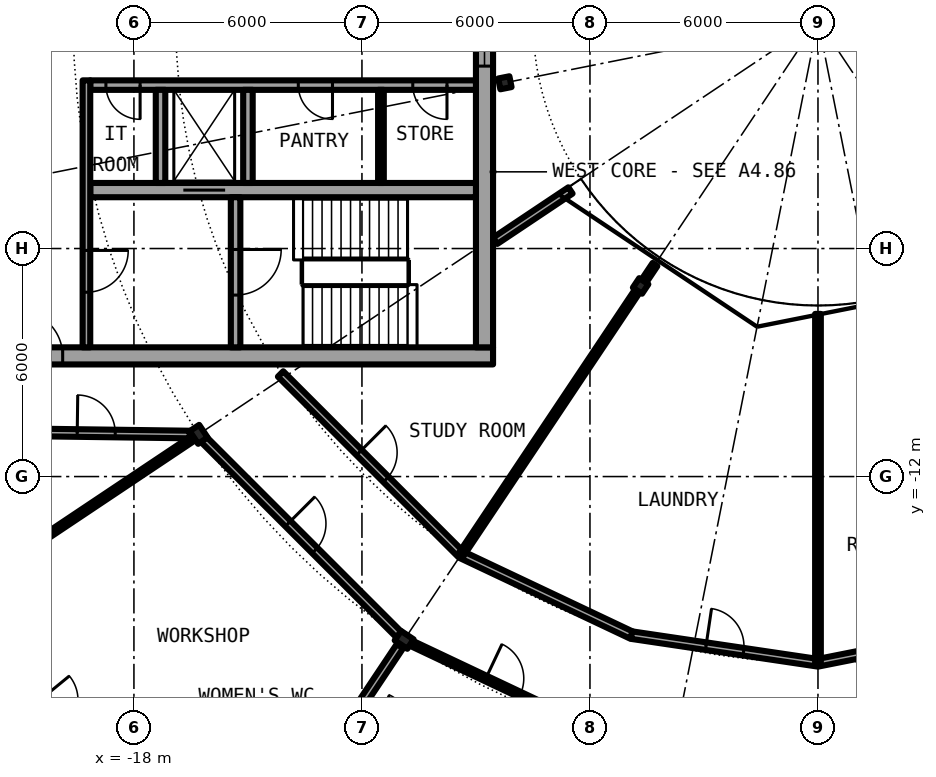
"""IFC4 building model, lengths in metres.
Left out: names, types, materials, properties, quantities, classifications, styles, units other than length and angle.
Written with IfcOpenShell. Run it as: python <this file> out.ifc"""

import sys

from ifc_helpers import new_model, si_unit, direction, frame, frame_2d, origin, origin_2d, place, context, subcontext, project, spatial, rectangle, i_section, extrude, element, fill, save


model = new_model("IFC4")
c1 = context("Model", 3, precision=1e-05, world=origin(), true_north=direction((0.0, 1.0)))
c2 = subcontext(c1, "Body", "Model", "MODEL_VIEW")
j1 = project(units=[si_unit("LENGTHUNIT", "METRE"), si_unit("PLANEANGLEUNIT", "RADIAN")], contexts=[c1])
p1 = place(None, origin())
s1 = spatial("IfcSite", under=j1, at=p1, CompositionType="ELEMENT")
p2 = place(p1, origin())
s2 = spatial("IfcBuilding", under=s1, at=p2, CompositionType="ELEMENT")
p3 = place(p2, frame((0.0, 0.0, 208.5)))
s3 = spatial("IfcBuildingStorey", under=s2, at=p3, CompositionType="ELEMENT", Elevation=208.5)
for number, where, z_axis, x_axis in (
    (1, (-16.297, -10.889, 0.0), (0.0, 0.0, 1.0), (-0.831, -0.556, 0.0)),
    (2, (-10.889, -16.297, 0.0), (0.0, 0.0, 1.0), (-0.556, -0.831, 0.0)),
):
    element("IfcColumn", number, at=place(p3, frame(where, z_axis=z_axis, x_axis=x_axis)), inside=s3, PredefinedType="COLUMN", context=c2, shape_type="SweptSolid", body=[
        extrude(i_section(OverallWidth=0.3, OverallDepth=0.4, WebThickness=0.013, FlangeThickness=0.024, FilletRadius=0.027, at=origin_2d()), origin(), (0.0, 0.0, 1.0), 4.2),
    ])
for number, where, z_axis, x_axis in (
    (3, (-8.239, -1.639, 0.0), (0.0, 0.0, 1.0), (-0.981, -0.195, 0.0)),
    (4, (-4.667, -6.984, 0.0), (0.0, 0.0, 1.0), (-0.556, -0.831, 0.0)),
):
    element("IfcColumn", number, at=place(p3, frame(where, z_axis=z_axis, x_axis=x_axis)), inside=s3, PredefinedType="COLUMN", context=c2, shape_type="SweptSolid", body=[
        extrude(i_section(OverallWidth=0.3, OverallDepth=0.29, WebThickness=0.009, FlangeThickness=0.014, FilletRadius=0.027, at=origin_2d()), origin(), (0.0, 0.0, 1.0), 4.2),
    ])
p4 = place(p3, frame((-22.699, -15.167, 0.0), z_axis=(0.0, 0.0, 1.0), x_axis=(0.634382322723, -0.773019449054, 0.0)))
e5 = element("IfcWall", 5, at=p4, inside=s3, PredefinedType="SOLIDWALL", context=c2, shape_type="SweptSolid", body=[
    extrude(rectangle(XDim=5.352, YDim=0.25, at=frame_2d((2.676, 0.0))), origin(), (0.0, 0.0, 1.0), 3.85),
])
p5 = place(p4, frame((0.841, 0.0, 0.0)))
e6 = element("IfcOpeningElement", 6, at=p5, cuts=e5, PredefinedType="OPENING", context=c2, shape_type="SweptSolid", body=[
    extrude(rectangle(XDim=1.0, YDim=2.2, at=frame_2d((0.5, 1.1))), frame((0.0, 0.135, 0.0), z_axis=(0.0, -1.0, 0.0), x_axis=(1.0, 0.0, 0.0)), (0.0, 0.0, 1.0), 0.27),
])
p6 = place(p4, frame((3.51, 0.0, 0.0)))
e7 = element("IfcOpeningElement", 7, at=p6, cuts=e5, PredefinedType="OPENING", context=c2, shape_type="SweptSolid", body=[
    extrude(rectangle(XDim=1.0, YDim=2.2, at=frame_2d((0.5, 1.1))), frame((0.0, 0.135, 0.0), z_axis=(0.0, -1.0, 0.0), x_axis=(1.0, 0.0, 0.0)), (0.0, 0.0, 1.0), 0.27),
])
p7 = place(p3, frame((-22.05, -8.825, 0.0), z_axis=(0.0, 0.0, 1.0), x_axis=(1.0, 0.0, 0.0)))
e8 = element("IfcWall", 8, at=p7, inside=s3, PredefinedType="SHEAR", context=c2, shape_type="SweptSolid", body=[
    extrude(rectangle(XDim=13.5, YDim=0.45, at=frame_2d((6.75, 0.0))), origin(), (0.0, 0.0, 1.0), 4.2),
])
p8 = place(p7, frame((0.975, 0.0, 0.0)))
e9 = element("IfcOpeningElement", 9, at=p8, cuts=e8, PredefinedType="OPENING", context=c2, shape_type="SweptSolid", body=[
    extrude(rectangle(XDim=1.2, YDim=2.3, at=frame_2d((0.6, 1.15))), frame((0.0, 0.235, 0.0), z_axis=(0.0, -1.0, 0.0), x_axis=(1.0, 0.0, 0.0)), (0.0, 0.0, 1.0), 0.47),
])
p9 = place(p3, frame((-8.775, 8.6, 0.0), z_axis=(0.0, 0.0, 1.0), x_axis=(0.0, -1.0, 0.0)))
e10 = element("IfcWall", 10, at=p9, inside=s3, PredefinedType="SHEAR", context=c2, shape_type="SweptSolid", body=[
    extrude(rectangle(XDim=17.2, YDim=0.45, at=frame_2d((8.6, 0.0))), origin(), (0.0, 0.0, 1.0), 4.2),
])
p10 = place(p9, frame((7.4, 0.0, 0.1)))
e11 = element("IfcOpeningElement", 11, at=p10, cuts=e10, PredefinedType="OPENING", context=c2, shape_type="SweptSolid", body=[
    extrude(rectangle(XDim=2.4, YDim=2.2, at=frame_2d((1.2, 1.1))), frame((0.0, 0.235, 0.0), z_axis=(0.0, -1.0, 0.0), x_axis=(1.0, 0.0, 0.0)), (0.0, 0.0, 1.0), 0.47),
])
p11 = place(p3, frame((-9.0, -1.7, 0.0), z_axis=(0.0, 0.0, 1.0), x_axis=(-1.0, 0.0, 0.0)))
e12 = element("IfcWall", 12, at=p11, inside=s3, PredefinedType="SHEAR", context=c2, shape_type="SweptSolid", body=[
    extrude(rectangle(XDim=10.15, YDim=0.25, at=frame_2d((5.075, 0.0))), origin(), (0.0, 0.0, 1.0), 4.2),
])
p12 = place(p11, frame((0.762, 0.0, 0.0)))
e13 = element("IfcOpeningElement", 13, at=p12, cuts=e12, PredefinedType="OPENING", context=c2, shape_type="SweptSolid", body=[
    extrude(rectangle(XDim=0.9, YDim=2.3, at=frame_2d((0.45, 1.15))), frame((0.0, 0.135, 0.0), z_axis=(0.0, -1.0, 0.0), x_axis=(1.0, 0.0, 0.0)), (0.0, 0.0, 1.0), 0.27),
])
p13 = place(p11, frame((3.775, 0.0, 0.0)))
e14 = element("IfcOpeningElement", 14, at=p13, cuts=e12, PredefinedType="OPENING", context=c2, shape_type="SweptSolid", body=[
    extrude(rectangle(XDim=0.9, YDim=2.3, at=frame_2d((0.45, 1.15))), frame((0.0, 0.135, 0.0), z_axis=(0.0, -1.0, 0.0), x_axis=(1.0, 0.0, 0.0)), (0.0, 0.0, 1.0), 0.27),
])
p14 = place(p11, frame((8.837, 0.0, 0.0)))
e15 = element("IfcOpeningElement", 15, at=p14, cuts=e12, PredefinedType="OPENING", context=c2, shape_type="SweptSolid", body=[
    extrude(rectangle(XDim=0.9, YDim=2.3, at=frame_2d((0.45, 1.15))), frame((0.0, 0.135, 0.0), z_axis=(0.0, -1.0, 0.0), x_axis=(1.0, 0.0, 0.0)), (0.0, 0.0, 1.0), 0.27),
])
p15 = place(p3, frame((-9.0, -4.462, 0.0), z_axis=(0.0, 0.0, 1.0), x_axis=(-1.0, 0.0, 0.0)))
e16 = element("IfcWall", 16, at=p15, inside=s3, PredefinedType="SHEAR", context=c2, shape_type="SweptSolid", body=[
    extrude(rectangle(XDim=10.15, YDim=0.375, at=frame_2d((5.075, 0.0))), origin(), (0.0, 0.0, 1.0), 4.2),
])
p16 = place(p15, frame((6.6, 0.0, 0.0)))
e17 = element("IfcOpeningElement", 17, at=p16, cuts=e16, PredefinedType="OPENING", context=c2, shape_type="SweptSolid", body=[
    extrude(rectangle(XDim=1.1, YDim=2.3, at=frame_2d((0.55, 1.15))), frame((0.0, 0.198, 0.0), z_axis=(0.0, -1.0, 0.0), x_axis=(1.0, 0.0, 0.0)), (0.0, 0.0, 1.0), 0.395),
])
p17 = place(p3, frame((-15.325, -4.65, 0.0), z_axis=(0.0, 0.0, 1.0), x_axis=(0.0, -1.0, 0.0)))
e18 = element("IfcWall", 18, at=p17, inside=s3, PredefinedType="SHEAR", context=c2, shape_type="SweptSolid", body=[
    extrude(rectangle(XDim=3.95, YDim=0.25, at=frame_2d((1.975, 0.0))), origin(), (0.0, 0.0, 1.0), 4.2),
])
p18 = place(p17, frame((1.375, 0.0, 0.0)))
e19 = element("IfcOpeningElement", 19, at=p18, cuts=e18, PredefinedType="OPENING", context=c2, shape_type="SweptSolid", body=[
    extrude(rectangle(XDim=1.2, YDim=2.3, at=frame_2d((0.6, 1.15))), frame((0.0, 0.135, 0.0), z_axis=(0.0, -1.0, 0.0), x_axis=(1.0, 0.0, 0.0)), (0.0, 0.0, 1.0), 0.27),
])
for number, where, z_axis, x_axis in (
    (20, (-15.0, -1.825, 0.0), (0.0, 0.0, 1.0), (0.0, -1.0, 0.0)),
    (21, (-17.3, -1.825, 0.0), (0.0, 0.0, 1.0), (0.0, -1.0, 0.0)),
):
    element("IfcWall", number, at=place(p3, frame(where, z_axis=z_axis, x_axis=x_axis)), inside=s3, PredefinedType="SOLIDWALL", context=c2, shape_type="SweptSolid", body=[
        extrude(rectangle(XDim=2.45, YDim=0.25, at=frame_2d((1.225, 0.0))), origin(), (0.0, 0.0, 1.0), 3.85),
    ])
p19 = place(p3, frame((-19.25, -1.575, 0.0), z_axis=(0.0, 0.0, 1.0), x_axis=(0.0, -1.0, 0.0)))
e22 = element("IfcWall", 22, at=p19, inside=s3, PredefinedType="SOLIDWALL", context=c2, shape_type="SweptSolid", body=[
    extrude(rectangle(XDim=7.025, YDim=0.2, at=frame_2d((3.513, 0.0))), origin(), (0.0, 0.0, 1.0), 3.85),
])
p20 = place(p19, frame((4.475, 0.0, 0.0)))
e23 = element("IfcOpeningElement", 23, at=p20, cuts=e22, PredefinedType="OPENING", context=c2, shape_type="SweptSolid", body=[
    extrude(rectangle(XDim=1.1, YDim=2.3, at=frame_2d((0.55, 1.15))), frame((0.0, 0.11, 0.0), z_axis=(0.0, -1.0, 0.0), x_axis=(1.0, 0.0, 0.0)), (0.0, 0.0, 1.0), 0.22),
])
p21 = place(p3, frame((-11.5, -1.825, 0.0), z_axis=(0.0, 0.0, 1.0), x_axis=(0.0, -1.0, 0.0)))
e24 = element("IfcWall", 24, at=p21, inside=s3, PredefinedType="PARTITIONING", context=c2, shape_type="SweptSolid", body=[
    extrude(rectangle(XDim=2.45, YDim=0.15, at=frame_2d((1.225, 0.0))), origin(), (0.0, 0.0, 1.0), 3.85),
])
p22 = place(p3, frame((-10.752, -16.362, 0.0), z_axis=(0.0, 0.0, 1.0), x_axis=(0.903996904196, -0.427539000798, 0.0)))
e25 = element("IfcWall", 25, at=p22, inside=s3, PredefinedType="PARTITIONING", context=c2, shape_type="SweptSolid", body=[
    extrude(rectangle(XDim=5.6, YDim=0.15, at=frame_2d((2.8, 0.0))), origin(), (0.0, 0.0, 1.0), 3.6),
])
p23 = place(p22, frame((2.224, 0.0, 0.0)))
e26 = element("IfcOpeningElement", 26, at=p23, cuts=e25, PredefinedType="OPENING", context=c2, shape_type="SweptSolid", body=[
    extrude(rectangle(XDim=1.0, YDim=2.3, at=frame_2d((0.5, 1.15))), frame((0.0, 0.085, 0.0), z_axis=(0.0, -1.0, 0.0), x_axis=(1.0, 0.0, 0.0)), (0.0, 0.0, 1.0), 0.17),
])
p24 = place(p3, frame((-16.189, -10.997, 0.0), z_axis=(0.0, 0.0, 1.0), x_axis=(0.707106781187, -0.707106781187, 0.0)))
e27 = element("IfcWall", 27, at=p24, inside=s3, PredefinedType="PARTITIONING", context=c2, shape_type="SweptSolid", body=[
    extrude(rectangle(XDim=7.343, YDim=0.2, at=frame_2d((3.671, 0.0))), origin(), (0.0, 0.0, 1.0), 3.6),
])
p25 = place(p24, frame((3.171, 0.0, 0.0)))
e28 = element("IfcOpeningElement", 28, at=p25, cuts=e27, PredefinedType="OPENING", context=c2, shape_type="SweptSolid", body=[
    extrude(rectangle(XDim=1.0, YDim=2.3, at=frame_2d((0.5, 1.15))), frame((0.0, 0.11, 0.0), z_axis=(0.0, -1.0, 0.0), x_axis=(1.0, 0.0, 0.0)), (0.0, 0.0, 1.0), 0.22),
])
p26 = place(p3, frame((-9.389, -14.052, 0.0), z_axis=(0.0, 0.0, 1.0), x_axis=(0.904000314399, -0.427531790123, 0.0)))
e29 = element("IfcWall", 29, at=p26, inside=s3, PredefinedType="PARTITIONING", context=c2, shape_type="SweptSolid", body=[
    extrude(rectangle(XDim=4.959, YDim=0.2, at=frame_2d((2.479, 0.0))), origin(), (0.0, 0.0, 1.0), 3.85),
])
p27 = place(p3, frame((-4.906, -16.172, 0.0), z_axis=(0.0, 0.0, 1.0), x_axis=(0.989175164373, -0.146739545409, 0.0)))
e30 = element("IfcWall", 30, at=p27, inside=s3, PredefinedType="PARTITIONING", context=c2, shape_type="SweptSolid", body=[
    extrude(rectangle(XDim=4.96, YDim=0.2, at=frame_2d((2.48, 0.0))), origin(), (0.0, 0.0, 1.0), 3.85),
])
p28 = place(p27, frame((1.98, 0.0, 0.0)))
e31 = element("IfcOpeningElement", 31, at=p28, cuts=e30, PredefinedType="OPENING", context=c2, shape_type="SweptSolid", body=[
    extrude(rectangle(XDim=1.0, YDim=2.3, at=frame_2d((0.5, 1.15))), frame((0.0, 0.11, 0.0), z_axis=(0.0, -1.0, 0.0), x_axis=(1.0, 0.0, 0.0)), (0.0, 0.0, 1.0), 0.22),
])
p29 = place(p3, frame((-14.141, -9.3, 0.0), z_axis=(0.0, 0.0, 1.0), x_axis=(0.707124944964, -0.707088616942, 0.0)))
e32 = element("IfcWall", 32, at=p29, inside=s3, PredefinedType="PARTITIONING", context=c2, shape_type="SweptSolid", body=[
    extrude(rectangle(XDim=6.72, YDim=0.2, at=frame_2d((3.36, 0.0))), origin(), (0.0, 0.0, 1.0), 3.85),
])
p30 = place(p29, frame((2.923, 0.0, 0.0)))
e33 = element("IfcOpeningElement", 33, at=p30, cuts=e32, PredefinedType="OPENING", context=c2, shape_type="SweptSolid", body=[
    extrude(rectangle(XDim=1.0, YDim=2.3, at=frame_2d((0.5, 1.15))), frame((0.0, 0.11, 0.0), z_axis=(0.0, -1.0, 0.0), x_axis=(1.0, 0.0, 0.0)), (0.0, 0.0, 1.0), 0.22),
])
p31 = place(p3, frame((0.0, -16.9, 0.0), z_axis=(0.0, 0.0, 1.0), x_axis=(0.980799374359, 0.195019453537, 0.0)))
e34 = element("IfcWall", 34, at=p31, inside=s3, PredefinedType="PARTITIONING", context=c2, shape_type="SweptSolid", body=[
    extrude(rectangle(XDim=6.594, YDim=0.2, at=frame_2d((3.297, 0.0))), origin(), (0.0, 0.0, 1.0), 3.85),
])
p32 = place(p31, frame((2.797, 0.0, 0.0)))
e35 = element("IfcOpeningElement", 35, at=p32, cuts=e34, PredefinedType="OPENING", context=c2, shape_type="SweptSolid", body=[
    extrude(rectangle(XDim=1.0, YDim=2.3, at=frame_2d((0.5, 1.15))), frame((0.0, 0.11, 0.0), z_axis=(0.0, -1.0, 0.0), x_axis=(1.0, 0.0, 0.0)), (0.0, 0.0, 1.0), 0.22),
])
p33 = place(p3, frame((-21.675, -10.825, 0.0), z_axis=(0.0, 0.0, 1.0), x_axis=(0.999909707888, -0.013437859594, 0.0)))
e36 = element("IfcWall", 36, at=p33, inside=s3, PredefinedType="PARTITIONING", context=c2, shape_type="SweptSolid", body=[
    extrude(rectangle(XDim=5.142, YDim=0.2, at=frame_2d((2.571, 0.0))), origin(), (0.0, 0.0, 1.0), 3.85),
])
p34 = place(p33, frame((2.183, 0.0, 0.0)))
e37 = element("IfcOpeningElement", 37, at=p34, cuts=e36, PredefinedType="OPENING", context=c2, shape_type="SweptSolid", body=[
    extrude(rectangle(XDim=1.0, YDim=2.3, at=frame_2d((0.5, 1.15))), frame((0.0, 0.11, 0.0), z_axis=(0.0, -1.0, 0.0), x_axis=(1.0, 0.0, 0.0)), (0.0, 0.0, 1.0), 0.22),
])
p35 = place(p3, frame((-6.513, -4.472, 0.0), z_axis=(0.0, 0.0, 1.0), x_axis=(-0.831403409976, -0.555669299026, 0.0)))
e38 = element("IfcWall", 38, at=p35, inside=s3, PredefinedType="PARTITIONING", context=c2, shape_type="SweptSolid", body=[
    extrude(rectangle(XDim=2.383, YDim=0.2, at=frame_2d((1.191, 0.0))), origin(), (0.0, 0.0, 1.0), 3.85),
])
p36 = place(p3, frame((-22.593, -15.101, 0.0), z_axis=(0.0, 0.0, 1.0), x_axis=(0.831418274402, 0.555647057933, 0.0)))
e39 = element("IfcWall", 39, at=p36, inside=s3, PredefinedType="PARTITIONING", context=c2, shape_type="SweptSolid", body=[
    extrude(rectangle(XDim=7.375, YDim=0.15, at=frame_2d((3.688, 0.0))), origin(), (0.0, 0.0, 1.0), 3.85),
])
p37 = place(p3, frame((-12.222, -18.292, 0.0), z_axis=(0.0, 0.0, 1.0), x_axis=(0.555493933307, 0.831520589077, 0.0)))
e40 = element("IfcWall", 40, at=p37, inside=s3, PredefinedType="PARTITIONING", context=c2, shape_type="SweptSolid", body=[
    extrude(rectangle(XDim=2.2, YDim=0.2, at=frame_2d((1.1, 0.0))), origin(), (0.0, 0.0, 1.0), 3.85),
])
p38 = place(p3, frame((-9.389, -14.052, 0.0), z_axis=(0.0, 0.0, 1.0), x_axis=(0.555704560542, 0.831379841825, 0.0)))
e41 = element("IfcWall", 41, at=p38, inside=s3, PredefinedType="PARTITIONING", context=c2, shape_type="SweptSolid", body=[
    extrude(rectangle(XDim=8.355, YDim=0.15, at=frame_2d((4.177, 0.0))), origin(), (0.0, 0.0, 1.0), 3.85),
])
p39 = place(p3, frame((-4.585, -6.864, 0.0), z_axis=(0.0, 0.0, 1.0), x_axis=(0.555754446524, 0.831346495253, 0.0)))
e42 = element("IfcWall", 42, at=p39, inside=s3, PredefinedType="PARTITIONING", context=c2, shape_type="SweptSolid", body=[
    extrude(rectangle(XDim=0.534, YDim=0.15, at=frame_2d((0.267, 0.0))), origin(), (0.0, 0.0, 1.0), 3.85),
])
p40 = place(p3, frame((0.0, -16.9, 0.0), z_axis=(0.0, 0.0, 1.0), x_axis=(0.0, 1.0, 0.0)))
e43 = element("IfcWall", 43, at=p40, inside=s3, PredefinedType="PARTITIONING", context=c2, shape_type="SweptSolid", body=[
    extrude(rectangle(XDim=9.18, YDim=0.15, at=frame_2d((4.59, 0.0))), origin(), (0.0, 0.0, 1.0), 3.85),
])
p41 = place(p16, origin())
e44 = element("IfcDoor", 44, at=p41, inside=s3, OperationType="DOUBLE_DOOR_SLIDING", PredefinedType="DOOR", context=c2, shape_type="SweptSolid", body=[
    extrude(rectangle(XDim=1.1, YDim=2.3, at=frame_2d((0.55, 1.15))), frame((0.0, 0.025, 0.0), z_axis=(0.0, -1.0, 0.0), x_axis=(1.0, 0.0, 0.0)), (0.0, 0.0, 1.0), 0.05),
])
fill(e17, e44)
p42 = place(p12, origin())
e45 = element("IfcDoor", 45, at=p42, inside=s3, OperationType="SINGLE_SWING_RIGHT", PredefinedType="DOOR", context=c2, shape_type="SweptSolid", body=[
    extrude(rectangle(XDim=0.9, YDim=2.3, at=frame_2d((0.45, 1.15))), frame((0.0, 0.025, 0.0), z_axis=(0.0, -1.0, 0.0), x_axis=(1.0, 0.0, 0.0)), (0.0, 0.0, 1.0), 0.05),
])
fill(e13, e45)
p43 = place(p13, origin())
e46 = element("IfcDoor", 46, at=p43, inside=s3, OperationType="SINGLE_SWING_RIGHT", PredefinedType="DOOR", context=c2, shape_type="SweptSolid", body=[
    extrude(rectangle(XDim=0.9, YDim=2.3, at=frame_2d((0.45, 1.15))), frame((0.0, 0.025, 0.0), z_axis=(0.0, -1.0, 0.0), x_axis=(1.0, 0.0, 0.0)), (0.0, 0.0, 1.0), 0.05),
])
fill(e14, e46)
p44 = place(p14, origin())
e47 = element("IfcDoor", 47, at=p44, inside=s3, OperationType="SINGLE_SWING_LEFT", PredefinedType="DOOR", context=c2, shape_type="SweptSolid", body=[
    extrude(rectangle(XDim=0.9, YDim=2.3, at=frame_2d((0.45, 1.15))), frame((0.0, 0.025, 0.0), z_axis=(0.0, -1.0, 0.0), x_axis=(1.0, 0.0, 0.0)), (0.0, 0.0, 1.0), 0.05),
])
fill(e15, e47)
p45 = place(p18, origin())
e48 = element("IfcDoor", 48, at=p45, inside=s3, OperationType="SINGLE_SWING_LEFT", PredefinedType="DOOR", context=c2, shape_type="SweptSolid", body=[
    extrude(rectangle(XDim=1.2, YDim=2.3, at=frame_2d((0.6, 1.15))), frame((0.0, 0.025, 0.0), z_axis=(0.0, -1.0, 0.0), x_axis=(1.0, 0.0, 0.0)), (0.0, 0.0, 1.0), 0.05),
])
fill(e19, e48)
p46 = place(p20, origin())
e49 = element("IfcDoor", 49, at=p46, inside=s3, OperationType="SINGLE_SWING_LEFT", PredefinedType="DOOR", context=c2, shape_type="SweptSolid", body=[
    extrude(rectangle(XDim=1.1, YDim=2.3, at=frame_2d((0.55, 1.15))), frame((0.0, 0.025, 0.0), z_axis=(0.0, -1.0, 0.0), x_axis=(1.0, 0.0, 0.0)), (0.0, 0.0, 1.0), 0.05),
])
fill(e23, e49)
p47 = place(p8, origin())
e50 = element("IfcDoor", 50, at=p47, inside=s3, OperationType="SINGLE_SWING_RIGHT", PredefinedType="DOOR", context=c2, shape_type="SweptSolid", body=[
    extrude(rectangle(XDim=1.2, YDim=2.3, at=frame_2d((0.6, 1.15))), frame((0.0, 0.025, 0.0), z_axis=(0.0, -1.0, 0.0), x_axis=(1.0, 0.0, 0.0)), (0.0, 0.0, 1.0), 0.05),
])
fill(e9, e50)
p48 = place(p10, origin())
e51 = element("IfcWindow", 51, at=p48, inside=s3, PartitioningType="SINGLE_PANEL", PredefinedType="WINDOW", context=c2, shape_type="SweptSolid", body=[
    extrude(rectangle(XDim=2.4, YDim=2.2, at=frame_2d((1.2, 1.1))), frame((0.0, 0.03, 0.0), z_axis=(0.0, -1.0, 0.0), x_axis=(1.0, 0.0, 0.0)), (0.0, 0.0, 1.0), 0.06),
])
fill(e11, e51)
p49 = place(p23, origin())
e52 = element("IfcDoor", 52, at=p49, inside=s3, OperationType="SINGLE_SWING_LEFT", PredefinedType="DOOR", context=c2, shape_type="SweptSolid", body=[
    extrude(rectangle(XDim=1.0, YDim=2.3, at=frame_2d((0.5, 1.15))), frame((0.0, 0.025, 0.0), z_axis=(0.0, -1.0, 0.0), x_axis=(1.0, 0.0, 0.0)), (0.0, 0.0, 1.0), 0.05),
])
fill(e26, e52)
p50 = place(p25, origin())
e53 = element("IfcDoor", 53, at=p50, inside=s3, OperationType="SINGLE_SWING_RIGHT", PredefinedType="DOOR", context=c2, shape_type="SweptSolid", body=[
    extrude(rectangle(XDim=1.0, YDim=2.3, at=frame_2d((0.5, 1.15))), frame((0.0, 0.025, 0.0), z_axis=(0.0, -1.0, 0.0), x_axis=(1.0, 0.0, 0.0)), (0.0, 0.0, 1.0), 0.05),
])
fill(e28, e53)
p51 = place(p30, origin())
e54 = element("IfcDoor", 54, at=p51, inside=s3, OperationType="SINGLE_SWING_LEFT", PredefinedType="DOOR", context=c2, shape_type="SweptSolid", body=[
    extrude(rectangle(XDim=1.0, YDim=2.3, at=frame_2d((0.5, 1.15))), frame((0.0, 0.025, 0.0), z_axis=(0.0, -1.0, 0.0), x_axis=(1.0, 0.0, 0.0)), (0.0, 0.0, 1.0), 0.05),
])
fill(e33, e54)
p52 = place(p28, origin())
e55 = element("IfcDoor", 55, at=p52, inside=s3, OperationType="SINGLE_SWING_LEFT", PredefinedType="DOOR", context=c2, shape_type="SweptSolid", body=[
    extrude(rectangle(XDim=1.0, YDim=2.3, at=frame_2d((0.5, 1.15))), frame((0.0, 0.025, 0.0), z_axis=(0.0, -1.0, 0.0), x_axis=(1.0, 0.0, 0.0)), (0.0, 0.0, 1.0), 0.05),
])
fill(e31, e55)
p53 = place(p34, origin())
e56 = element("IfcDoor", 56, at=p53, inside=s3, OperationType="SINGLE_SWING_RIGHT", PredefinedType="DOOR", context=c2, shape_type="SweptSolid", body=[
    extrude(rectangle(XDim=1.0, YDim=2.3, at=frame_2d((0.5, 1.15))), frame((0.0, 0.025, 0.0), z_axis=(0.0, -1.0, 0.0), x_axis=(1.0, 0.0, 0.0)), (0.0, 0.0, 1.0), 0.05),
])
fill(e37, e56)
save(model, sys.argv[1])
